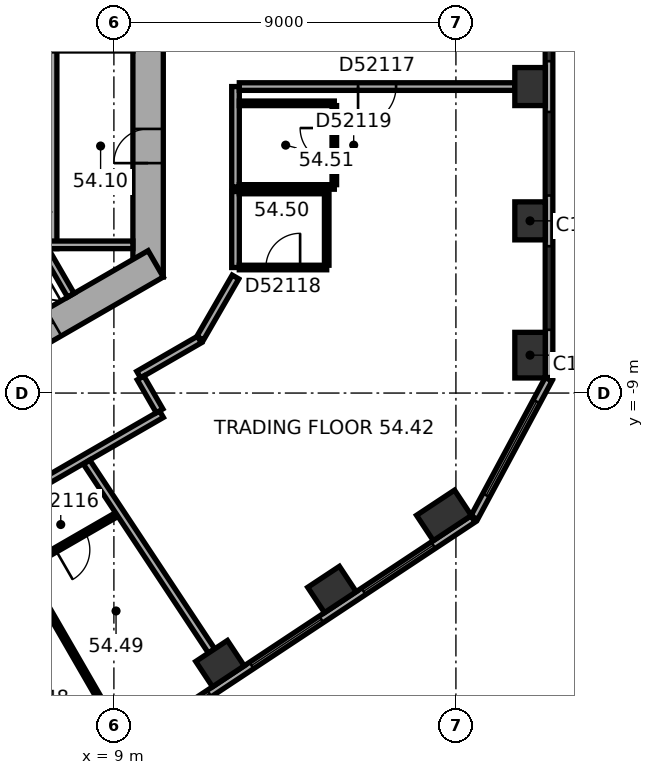
"""IFC4 building model, lengths in metres.
Left out: names, types, materials, properties, quantities, classifications, styles, units other than length and angle.
Written with IfcOpenShell. Run it as: python <this file> out.ifc"""

import sys

from ifc_helpers import new_model, si_unit, direction, frame, frame_2d, origin, origin_2d, place, context, subcontext, project, spatial, rectangle, extrude, element, fill, save


model = new_model("IFC4")
c1 = context("Model", 3, precision=1e-05, world=origin(), true_north=direction((0.0, 1.0)))
c2 = subcontext(c1, "Body", "Model", "MODEL_VIEW")
j1 = project(units=[si_unit("LENGTHUNIT", "METRE"), si_unit("PLANEANGLEUNIT", "RADIAN")], contexts=[c1])
p1 = place(None, origin())
s1 = spatial("IfcSite", under=j1, at=p1, CompositionType="ELEMENT")
p2 = place(p1, origin())
s2 = spatial("IfcBuilding", under=s1, at=p2, CompositionType="ELEMENT")
p3 = place(p2, frame((0.0, 0.0, 221.7)))
s3 = spatial("IfcBuildingStorey", under=s2, at=p3, CompositionType="ELEMENT", Elevation=221.7)
p4 = place(p3, frame((19.95, -8.003, 0.0), z_axis=(0.0, 0.0, 1.0), x_axis=(0.0, 1.0, 0.0)))
e1 = element("IfcColumn", 1, at=p4, inside=s3, PredefinedType="COLUMN", context=c2, shape_type="SweptSolid", body=[
    extrude(rectangle(XDim=1.2, YDim=0.8, at=origin_2d()), origin(), (0.0, 0.0, 1.0), 3.7),
])
for number, where, z_axis, x_axis in (
    (2, (19.95, -4.469, 0.0), (0.0, 0.0, 1.0), (0.0, 1.0, 0.0)),
    (3, (19.95, -0.936, 0.0), (0.0, 0.0, 1.0), (0.0, 1.0, 0.0)),
    (4, (11.791, -16.12, 0.0), (0.0, 0.0, 1.0), (0.834, 0.552, 0.0)),
    (5, (14.738, -14.169, 0.0), (0.0, 0.0, 1.0), (0.834, 0.552, 0.0)),
):
    element("IfcColumn", number, at=place(p3, frame(where, z_axis=z_axis, x_axis=x_axis)), inside=s3, PredefinedType="COLUMN", context=c2, shape_type="SweptSolid", body=[
        extrude(rectangle(XDim=1.0, YDim=0.8, at=origin_2d()), origin(), (0.0, 0.0, 1.0), 3.7),
    ])
p5 = place(p3, frame((17.685, -12.219, 0.0), z_axis=(0.0, 0.0, 1.0), x_axis=(0.833885822067, 0.551936985312, 0.0)))
e6 = element("IfcColumn", 6, at=p5, inside=s3, PredefinedType="COLUMN", context=c2, shape_type="SweptSolid", body=[
    extrude(rectangle(XDim=1.2, YDim=0.8, at=origin_2d()), origin(), (0.0, 0.0, 1.0), 3.7),
])
p6 = place(p3, frame((9.9, -5.947, 0.0), z_axis=(0.0, 0.0, 1.0), x_axis=(0.0, 1.0, 0.0)))
e7 = element("IfcWall", 7, at=p6, inside=s3, PredefinedType="SHEAR", context=c2, shape_type="SweptSolid", body=[
    extrude(rectangle(XDim=11.894, YDim=0.8, at=frame_2d((5.947, 0.0))), origin(), (0.0, 0.0, 1.0), 3.7),
])
p7 = place(p6, frame((6.147, 0.0, 0.0)))
e8 = element("IfcOpeningElement", 8, at=p7, cuts=e7, PredefinedType="OPENING", context=c2, shape_type="SweptSolid", body=[
    extrude(rectangle(XDim=1.5, YDim=2.1, at=frame_2d((0.75, 1.05))), frame((0.0, 0.41, 0.0), z_axis=(0.0, -1.0, 0.0), x_axis=(1.0, 0.0, 0.0)), (0.0, 0.0, 1.0), 0.82),
])
p8 = place(p6, frame((2.997, 0.0, 0.0)))
e9 = element("IfcOpeningElement", 9, at=p8, cuts=e7, PredefinedType="OPENING", context=c2, shape_type="SweptSolid", body=[
    extrude(rectangle(XDim=0.9, YDim=2.1, at=frame_2d((0.45, 1.05))), frame((0.0, 0.41, 0.0), z_axis=(0.0, -1.0, 0.0), x_axis=(1.0, 0.0, 0.0)), (0.0, 0.0, 1.0), 0.82),
])
p9 = place(p3, frame((-0.2, -11.547, 0.0), z_axis=(0.0, 0.0, 1.0), x_axis=(0.866023897231, 0.500002609418, 0.0)))
e10 = element("IfcWall", 10, at=p9, inside=s3, PredefinedType="SHEAR", context=c2, shape_type="SweptSolid", body=[
    extrude(rectangle(XDim=11.894, YDim=0.8, at=frame_2d((5.947, 0.0))), origin(), (0.0, 0.0, 1.0), 3.7),
])
p10 = place(p9, frame((2.497, 0.0, 0.0)))
e11 = element("IfcOpeningElement", 11, at=p10, cuts=e10, PredefinedType="OPENING", context=c2, shape_type="SweptSolid", body=[
    extrude(rectangle(XDim=1.1, YDim=2.1, at=frame_2d((0.55, 1.05))), frame((0.0, 0.41, 0.0), z_axis=(0.0, -1.0, 0.0), x_axis=(1.0, 0.0, 0.0)), (0.0, 0.0, 1.0), 0.82),
])
p11 = place(p9, frame((5.097, 0.0, 0.0)))
e12 = element("IfcOpeningElement", 12, at=p11, cuts=e10, PredefinedType="OPENING", context=c2, shape_type="SweptSolid", body=[
    extrude(rectangle(XDim=1.1, YDim=2.1, at=frame_2d((0.55, 1.05))), frame((0.0, 0.41, 0.0), z_axis=(0.0, -1.0, 0.0), x_axis=(1.0, 0.0, 0.0)), (0.0, 0.0, 1.0), 0.82),
])
p12 = place(p9, frame((7.697, 0.0, 0.0)))
e13 = element("IfcOpeningElement", 13, at=p12, cuts=e10, PredefinedType="OPENING", context=c2, shape_type="SweptSolid", body=[
    extrude(rectangle(XDim=1.1, YDim=2.1, at=frame_2d((0.55, 1.05))), frame((0.0, 0.41, 0.0), z_axis=(0.0, -1.0, 0.0), x_axis=(1.0, 0.0, 0.0)), (0.0, 0.0, 1.0), 0.82),
])
p13 = place(p3, frame((20.45, -8.59, 0.0), z_axis=(0.0, 0.0, 1.0), x_axis=(0.0, 1.0, 0.0)))
e14 = element("IfcWall", 14, at=p13, inside=s3, PredefinedType="STANDARD", context=c2, shape_type="SweptSolid", body=[
    extrude(rectangle(XDim=18.841, YDim=0.2, at=frame_2d((9.421, 0.0))), origin(), (0.0, 0.0, 1.0), 3.7),
])
p14 = place(p13, frame((1.254, 0.0, 0.9)))
e15 = element("IfcOpeningElement", 15, at=p14, cuts=e14, PredefinedType="OPENING", context=c2, shape_type="SweptSolid", body=[
    extrude(rectangle(XDim=2.2, YDim=2.0, at=frame_2d((1.1, 1.0))), frame((0.0, 0.11, 0.0), z_axis=(0.0, -1.0, 0.0), x_axis=(1.0, 0.0, 0.0)), (0.0, 0.0, 1.0), 0.22),
])
p15 = place(p13, frame((4.788, 0.0, 0.9)))
e16 = element("IfcOpeningElement", 16, at=p15, cuts=e14, PredefinedType="OPENING", context=c2, shape_type="SweptSolid", body=[
    extrude(rectangle(XDim=2.2, YDim=2.0, at=frame_2d((1.1, 1.0))), frame((0.0, 0.11, 0.0), z_axis=(0.0, -1.0, 0.0), x_axis=(1.0, 0.0, 0.0)), (0.0, 0.0, 1.0), 0.22),
])
p16 = place(p13, frame((8.322, 0.0, 0.9)))
e17 = element("IfcOpeningElement", 17, at=p16, cuts=e14, PredefinedType="OPENING", context=c2, shape_type="SweptSolid", body=[
    extrude(rectangle(XDim=2.2, YDim=2.0, at=frame_2d((1.1, 1.0))), frame((0.0, 0.11, 0.0), z_axis=(0.0, -1.0, 0.0), x_axis=(1.0, 0.0, 0.0)), (0.0, 0.0, 1.0), 0.22),
])
p17 = place(p13, frame((11.855, 0.0, 0.9)))
e18 = element("IfcOpeningElement", 18, at=p17, cuts=e14, PredefinedType="OPENING", context=c2, shape_type="SweptSolid", body=[
    extrude(rectangle(XDim=2.2, YDim=2.0, at=frame_2d((1.1, 1.0))), frame((0.0, 0.11, 0.0), z_axis=(0.0, -1.0, 0.0), x_axis=(1.0, 0.0, 0.0)), (0.0, 0.0, 1.0), 0.22),
])
p18 = place(p13, frame((15.389, 0.0, 0.9)))
e19 = element("IfcOpeningElement", 19, at=p18, cuts=e14, PredefinedType="OPENING", context=c2, shape_type="SweptSolid", body=[
    extrude(rectangle(XDim=2.2, YDim=2.0, at=frame_2d((1.1, 1.0))), frame((0.0, 0.11, 0.0), z_axis=(0.0, -1.0, 0.0), x_axis=(1.0, 0.0, 0.0)), (0.0, 0.0, 1.0), 0.22),
])
p19 = place(p3, frame((2.739, -22.711, 0.0), z_axis=(0.0, 0.0, 1.0), x_axis=(0.833885723098, 0.551937134838, 0.0)))
e20 = element("IfcWall", 20, at=p19, inside=s3, PredefinedType="STANDARD", context=c2, shape_type="SweptSolid", body=[
    extrude(rectangle(XDim=18.841, YDim=0.2, at=frame_2d((9.421, 0.0))), origin(), (0.0, 0.0, 1.0), 3.7),
])
p20 = place(p19, frame((1.252, 0.0, 0.9)))
e21 = element("IfcOpeningElement", 21, at=p20, cuts=e20, PredefinedType="OPENING", context=c2, shape_type="SweptSolid", body=[
    extrude(rectangle(XDim=2.2, YDim=2.0, at=frame_2d((1.1, 1.0))), frame((0.0, 0.11, 0.0), z_axis=(0.0, -1.0, 0.0), x_axis=(1.0, 0.0, 0.0)), (0.0, 0.0, 1.0), 0.22),
])
p21 = place(p19, frame((4.786, 0.0, 0.9)))
e22 = element("IfcOpeningElement", 22, at=p21, cuts=e20, PredefinedType="OPENING", context=c2, shape_type="SweptSolid", body=[
    extrude(rectangle(XDim=2.2, YDim=2.0, at=frame_2d((1.1, 1.0))), frame((0.0, 0.11, 0.0), z_axis=(0.0, -1.0, 0.0), x_axis=(1.0, 0.0, 0.0)), (0.0, 0.0, 1.0), 0.22),
])
p22 = place(p19, frame((8.32, 0.0, 0.9)))
e23 = element("IfcOpeningElement", 23, at=p22, cuts=e20, PredefinedType="OPENING", context=c2, shape_type="SweptSolid", body=[
    extrude(rectangle(XDim=2.2, YDim=2.0, at=frame_2d((1.1, 1.0))), frame((0.0, 0.11, 0.0), z_axis=(0.0, -1.0, 0.0), x_axis=(1.0, 0.0, 0.0)), (0.0, 0.0, 1.0), 0.22),
])
p23 = place(p19, frame((11.854, 0.0, 0.9)))
e24 = element("IfcOpeningElement", 24, at=p23, cuts=e20, PredefinedType="OPENING", context=c2, shape_type="SweptSolid", body=[
    extrude(rectangle(XDim=2.2, YDim=2.0, at=frame_2d((1.1, 1.0))), frame((0.0, 0.11, 0.0), z_axis=(0.0, -1.0, 0.0), x_axis=(1.0, 0.0, 0.0)), (0.0, 0.0, 1.0), 0.22),
])
p24 = place(p19, frame((15.387, 0.0, 0.9)))
e25 = element("IfcOpeningElement", 25, at=p24, cuts=e20, PredefinedType="OPENING", context=c2, shape_type="SweptSolid", body=[
    extrude(rectangle(XDim=2.2, YDim=2.0, at=frame_2d((1.1, 1.0))), frame((0.0, 0.11, 0.0), z_axis=(0.0, -1.0, 0.0), x_axis=(1.0, 0.0, 0.0)), (0.0, 0.0, 1.0), 0.22),
])
p25 = place(p3, frame((18.483, -12.276, 0.0), z_axis=(0.0, 0.0, 1.0), x_axis=(0.473267675015, 0.880918672629, 0.0)))
e26 = element("IfcWall", 26, at=p25, inside=s3, PredefinedType="STANDARD", context=c2, shape_type="SweptSolid", body=[
    extrude(rectangle(XDim=4.13, YDim=0.2, at=frame_2d((2.065, 0.0))), origin(), (0.0, 0.0, 1.0), 3.7),
])
p26 = place(p25, frame((0.665, 0.0, 0.9)))
e27 = element("IfcOpeningElement", 27, at=p26, cuts=e26, PredefinedType="OPENING", context=c2, shape_type="SweptSolid", body=[
    extrude(rectangle(XDim=2.8, YDim=2.0, at=frame_2d((1.4, 1.0))), frame((0.0, 0.11, 0.0), z_axis=(0.0, -1.0, 0.0), x_axis=(1.0, 0.0, 0.0)), (0.0, 0.0, 1.0), 0.22),
])
p27 = place(p3, frame((7.4, -5.2, 0.0), z_axis=(0.0, 0.0, 1.0), x_axis=(0.0, 1.0, 0.0)))
e28 = element("IfcWall", 28, at=p27, inside=s3, PredefinedType="PARTITIONING", context=c2, shape_type="SweptSolid", body=[
    extrude(rectangle(XDim=5.4, YDim=0.2, at=frame_2d((2.7, 0.0))), origin(), (0.0, 0.0, 1.0), 3.42),
])
for number, where, z_axis, x_axis in (
    (29, (7.3, -5.1, 0.0), (0.0, 0.0, 1.0), (1.0, 0.0, 0.0)),
    (30, (6.768, -4.522, 0.0), (0.0, 0.0, 1.0), (0.5, -0.866, 0.0)),
):
    element("IfcWall", number, at=place(p3, frame(where, z_axis=z_axis, x_axis=x_axis)), inside=s3, PredefinedType="PARTITIONING", context=c2, shape_type="SweptSolid", body=[
        extrude(rectangle(XDim=2.2, YDim=0.2, at=frame_2d((1.1, 0.0))), origin(), (0.0, 0.0, 1.0), 3.42),
    ])
p28 = place(p3, frame((2.716, -13.906, 0.0), z_axis=(0.0, 0.0, 1.0), x_axis=(0.866040290674, 0.499974214264, 0.0)))
e31 = element("IfcWall", 31, at=p28, inside=s3, PredefinedType="PARTITIONING", context=c2, shape_type="SweptSolid", body=[
    extrude(rectangle(XDim=8.702, YDim=0.2, at=frame_2d((4.351, 0.0))), origin(), (0.0, 0.0, 1.0), 3.42),
])
p29 = place(p28, frame((2.679, 0.0, 0.0)))
e32 = element("IfcOpeningElement", 32, at=p29, cuts=e31, PredefinedType="OPENING", context=c2, shape_type="SweptSolid", body=[
    extrude(rectangle(XDim=1.0, YDim=2.1, at=frame_2d((0.5, 1.05))), frame((0.0, 0.11, 0.0), z_axis=(0.0, -1.0, 0.0), x_axis=(1.0, 0.0, 0.0)), (0.0, 0.0, 1.0), 0.22),
])
p30 = place(p3, frame((3.117, -15.638, 0.0), z_axis=(0.0, 0.0, 1.0), x_axis=(0.866031365477, 0.499989673903, 0.0)))
e33 = element("IfcWall", 33, at=p30, inside=s3, PredefinedType="PARTITIONING", context=c2, shape_type="SweptSolid", body=[
    extrude(rectangle(XDim=6.881, YDim=0.12, at=frame_2d((3.44, 0.0))), origin(), (0.0, 0.0, 1.0), 3.42),
])
p31 = place(p30, frame((0.5, 0.0, 0.0)))
e34 = element("IfcOpeningElement", 34, at=p31, cuts=e33, PredefinedType="OPENING", context=c2, shape_type="SweptSolid", body=[
    extrude(rectangle(XDim=1.0, YDim=2.1, at=frame_2d((0.5, 1.05))), frame((0.0, 0.07, 0.0), z_axis=(0.0, -1.0, 0.0), x_axis=(1.0, 0.0, 0.0)), (0.0, 0.0, 1.0), 0.14),
])
p32 = place(p30, frame((2.583, 0.0, 0.0)))
e35 = element("IfcOpeningElement", 35, at=p32, cuts=e33, PredefinedType="OPENING", context=c2, shape_type="SweptSolid", body=[
    extrude(rectangle(XDim=0.9, YDim=2.1, at=frame_2d((0.45, 1.05))), frame((0.0, 0.07, 0.0), z_axis=(0.0, -1.0, 0.0), x_axis=(1.0, 0.0, 0.0)), (0.0, 0.0, 1.0), 0.14),
])
p33 = place(p30, frame((5.023, 0.0, 0.0)))
e36 = element("IfcOpeningElement", 36, at=p33, cuts=e33, PredefinedType="OPENING", context=c2, shape_type="SweptSolid", body=[
    extrude(rectangle(XDim=0.9, YDim=2.1, at=frame_2d((0.45, 1.05))), frame((0.0, 0.07, 0.0), z_axis=(0.0, -1.0, 0.0), x_axis=(1.0, 0.0, 0.0)), (0.0, 0.0, 1.0), 0.14),
])
p34 = place(p3, frame((8.912, -17.545, 0.0), z_axis=(0.0, 0.0, 1.0), x_axis=(-0.500022113525, 0.866012636158, 0.0)))
e37 = element("IfcWall", 37, at=p34, inside=s3, PredefinedType="PARTITIONING", context=c2, shape_type="SweptSolid", body=[
    extrude(rectangle(XDim=4.49, YDim=0.12, at=frame_2d((2.245, 0.0))), origin(), (0.0, 0.0, 1.0), 2.87),
])
p35 = place(p3, frame((9.652, -8.515, 0.0), z_axis=(0.0, 0.0, 1.0), x_axis=(0.866020375458, 0.500008709215, 0.0)))
e38 = element("IfcWall", 38, at=p35, inside=s3, PredefinedType="PARTITIONING", context=c2, shape_type="SweptSolid", body=[
    extrude(rectangle(XDim=1.846, YDim=0.2, at=frame_2d((0.923, 0.0))), origin(), (0.0, 0.0, 1.0), 3.42),
])
p36 = place(p3, frame((10.202, -9.469, 0.0), z_axis=(0.0, 0.0, 1.0), x_axis=(-0.499968756647, 0.866043441391, 0.0)))
e39 = element("IfcWall", 39, at=p36, inside=s3, PredefinedType="PARTITIONING", context=c2, shape_type="SweptSolid", body=[
    extrude(rectangle(XDim=1.001, YDim=0.2, at=frame_2d((0.5, 0.0))), origin(), (0.0, 0.0, 1.0), 3.42),
])
p37 = place(p3, frame((11.27, -7.558, 0.0), z_axis=(0.0, 0.0, 1.0), x_axis=(0.499964847546, 0.866045698112, 0.0)))
e40 = element("IfcWall", 40, at=p37, inside=s3, PredefinedType="PARTITIONING", context=c2, shape_type="SweptSolid", body=[
    extrude(rectangle(XDim=1.86, YDim=0.2, at=frame_2d((0.93, 0.0))), origin(), (0.0, 0.0, 1.0), 3.42),
])
p38 = place(p3, frame((11.571, -15.786, 0.0), z_axis=(0.0, 0.0, 1.0), x_axis=(-0.551944861763, 0.833880608705, 0.0)))
e41 = element("IfcWall", 41, at=p38, inside=s3, PredefinedType="PARTITIONING", context=c2, shape_type="SweptSolid", body=[
    extrude(rectangle(XDim=5.957, YDim=0.2, at=frame_2d((2.979, 0.0))), origin(), (0.0, 0.0, 1.0), 3.42),
])
p39 = place(p3, frame((12.2, -5.697, 0.0), z_axis=(0.0, 0.0, 1.0), x_axis=(0.0, 1.0, 0.0)))
e42 = element("IfcWall", 42, at=p39, inside=s3, PredefinedType="PARTITIONING", context=c2, shape_type="SweptSolid", body=[
    extrude(rectangle(XDim=2.0, YDim=0.2, at=frame_2d((1.0, 0.0))), origin(), (0.0, 0.0, 1.0), 3.42),
])
p40 = place(p3, frame((12.2, -3.577, 0.0), z_axis=(0.0, 0.0, 1.0), x_axis=(0.0, 1.0, 0.0)))
e43 = element("IfcWall", 43, at=p40, inside=s3, PredefinedType="PARTITIONING", context=c2, shape_type="SweptSolid", body=[
    extrude(rectangle(XDim=2.641, YDim=0.2, at=frame_2d((1.321, 0.0))), origin(), (0.0, 0.0, 1.0), 3.42),
])
p41 = place(p3, frame((12.3, -3.697, 0.0), z_axis=(0.0, 0.0, 1.0), x_axis=(1.0, 0.0, 0.0)))
e44 = element("IfcWall", 44, at=p41, inside=s3, PredefinedType="PARTITIONING", context=c2, shape_type="SweptSolid", body=[
    extrude(rectangle(XDim=2.3, YDim=0.12, at=frame_2d((1.15, 0.0))), origin(), (0.0, 0.0, 1.0), 3.42),
])
p42 = place(p3, frame((12.3, -1.377, 0.0), z_axis=(0.0, 0.0, 1.0), x_axis=(1.0, 0.0, 0.0)))
e45 = element("IfcWall", 45, at=p42, inside=s3, PredefinedType="PARTITIONING", context=c2, shape_type="SweptSolid", body=[
    extrude(rectangle(XDim=2.5, YDim=0.12, at=frame_2d((1.25, 0.0))), origin(), (0.0, 0.0, 1.0), 3.42),
])
p43 = place(p3, frame((12.3, -0.936, 0.0), z_axis=(0.0, 0.0, 1.0), x_axis=(1.0, 0.0, 0.0)))
e46 = element("IfcWall", 46, at=p43, inside=s3, PredefinedType="PARTITIONING", context=c2, shape_type="SweptSolid", body=[
    extrude(rectangle(XDim=7.25, YDim=0.2, at=frame_2d((3.625, 0.0))), origin(), (0.0, 0.0, 1.0), 2.87),
])
p44 = place(p43, frame((3.125, 0.0, 0.0)))
e47 = element("IfcOpeningElement", 47, at=p44, cuts=e46, PredefinedType="OPENING", context=c2, shape_type="SweptSolid", body=[
    extrude(rectangle(XDim=1.0, YDim=2.1, at=frame_2d((0.5, 1.05))), frame((0.0, 0.11, 0.0), z_axis=(0.0, -1.0, 0.0), x_axis=(1.0, 0.0, 0.0)), (0.0, 0.0, 1.0), 0.22),
])
p45 = place(p3, frame((14.6, -5.697, 0.0), z_axis=(0.0, 0.0, 1.0), x_axis=(-1.0, 0.0, 0.0)))
e48 = element("IfcWall", 48, at=p45, inside=s3, PredefinedType="PARTITIONING", context=c2, shape_type="SweptSolid", body=[
    extrude(rectangle(XDim=2.3, YDim=0.12, at=frame_2d((1.15, 0.0))), origin(), (0.0, 0.0, 1.0), 3.42),
])
p46 = place(p45, frame((0.7, 0.0, 0.0)))
e49 = element("IfcOpeningElement", 49, at=p46, cuts=e48, PredefinedType="OPENING", context=c2, shape_type="SweptSolid", body=[
    extrude(rectangle(XDim=0.9, YDim=2.1, at=frame_2d((0.45, 1.05))), frame((0.0, 0.07, 0.0), z_axis=(0.0, -1.0, 0.0), x_axis=(1.0, 0.0, 0.0)), (0.0, 0.0, 1.0), 0.14),
])
p47 = place(p3, frame((14.6, -3.757, 0.0), z_axis=(0.0, 0.0, 1.0), x_axis=(0.0, -1.0, 0.0)))
e50 = element("IfcWall", 50, at=p47, inside=s3, PredefinedType="PARTITIONING", context=c2, shape_type="SweptSolid", body=[
    extrude(rectangle(XDim=1.88, YDim=0.12, at=frame_2d((0.94, 0.0))), origin(), (0.0, 0.0, 1.0), 3.42),
])
p48 = place(p3, frame((14.8, -3.577, 0.0), z_axis=(0.0, 0.0, 1.0), x_axis=(-1.0, 0.0, 0.0)))
e51 = element("IfcWall", 51, at=p48, inside=s3, PredefinedType="PARTITIONING", context=c2, shape_type="SweptSolid", body=[
    extrude(rectangle(XDim=2.5, YDim=0.12, at=frame_2d((1.25, 0.0))), origin(), (0.0, 0.0, 1.0), 3.42),
])
p49 = place(p3, frame((14.8, -1.437, 0.0), z_axis=(0.0, 0.0, 1.0), x_axis=(0.0, -1.0, 0.0)))
e52 = element("IfcWall", 52, at=p49, inside=s3, PredefinedType="PARTITIONING", context=c2, shape_type="SweptSolid", body=[
    extrude(rectangle(XDim=2.08, YDim=0.12, at=frame_2d((1.04, 0.0))), origin(), (0.0, 0.0, 1.0), 3.42),
])
p50 = place(p49, frame((0.59, 0.0, 0.0)))
e53 = element("IfcOpeningElement", 53, at=p50, cuts=e52, PredefinedType="OPENING", context=c2, shape_type="SweptSolid", body=[
    extrude(rectangle(XDim=0.9, YDim=2.1, at=frame_2d((0.45, 1.05))), frame((0.0, 0.07, 0.0), z_axis=(0.0, -1.0, 0.0), x_axis=(1.0, 0.0, 0.0)), (0.0, 0.0, 1.0), 0.14),
])
p51 = place(p14, origin())
e54 = element("IfcWindow", 54, at=p51, inside=s3, PartitioningType="SINGLE_PANEL", PredefinedType="WINDOW", context=c2, shape_type="SweptSolid", body=[
    extrude(rectangle(XDim=2.2, YDim=2.0, at=frame_2d((1.1, 1.0))), frame((0.0, 0.03, 0.0), z_axis=(0.0, -1.0, 0.0), x_axis=(1.0, 0.0, 0.0)), (0.0, 0.0, 1.0), 0.06),
])
fill(e15, e54)
p52 = place(p15, origin())
e55 = element("IfcWindow", 55, at=p52, inside=s3, PartitioningType="SINGLE_PANEL", PredefinedType="WINDOW", context=c2, shape_type="SweptSolid", body=[
    extrude(rectangle(XDim=2.2, YDim=2.0, at=frame_2d((1.1, 1.0))), frame((0.0, 0.03, 0.0), z_axis=(0.0, -1.0, 0.0), x_axis=(1.0, 0.0, 0.0)), (0.0, 0.0, 1.0), 0.06),
])
fill(e16, e55)
p53 = place(p16, origin())
e56 = element("IfcWindow", 56, at=p53, inside=s3, PartitioningType="SINGLE_PANEL", PredefinedType="WINDOW", context=c2, shape_type="SweptSolid", body=[
    extrude(rectangle(XDim=2.2, YDim=2.0, at=frame_2d((1.1, 1.0))), frame((0.0, 0.03, 0.0), z_axis=(0.0, -1.0, 0.0), x_axis=(1.0, 0.0, 0.0)), (0.0, 0.0, 1.0), 0.06),
])
fill(e17, e56)
p54 = place(p22, origin())
e57 = element("IfcWindow", 57, at=p54, inside=s3, PartitioningType="SINGLE_PANEL", PredefinedType="WINDOW", context=c2, shape_type="SweptSolid", body=[
    extrude(rectangle(XDim=2.2, YDim=2.0, at=frame_2d((1.1, 1.0))), frame((0.0, 0.03, 0.0), z_axis=(0.0, -1.0, 0.0), x_axis=(1.0, 0.0, 0.0)), (0.0, 0.0, 1.0), 0.06),
])
fill(e23, e57)
p55 = place(p23, origin())
e58 = element("IfcWindow", 58, at=p55, inside=s3, PartitioningType="SINGLE_PANEL", PredefinedType="WINDOW", context=c2, shape_type="SweptSolid", body=[
    extrude(rectangle(XDim=2.2, YDim=2.0, at=frame_2d((1.1, 1.0))), frame((0.0, 0.03, 0.0), z_axis=(0.0, -1.0, 0.0), x_axis=(1.0, 0.0, 0.0)), (0.0, 0.0, 1.0), 0.06),
])
fill(e24, e58)
p56 = place(p24, origin())
e59 = element("IfcWindow", 59, at=p56, inside=s3, PartitioningType="SINGLE_PANEL", PredefinedType="WINDOW", context=c2, shape_type="SweptSolid", body=[
    extrude(rectangle(XDim=2.2, YDim=2.0, at=frame_2d((1.1, 1.0))), frame((0.0, 0.03, 0.0), z_axis=(0.0, -1.0, 0.0), x_axis=(1.0, 0.0, 0.0)), (0.0, 0.0, 1.0), 0.06),
])
fill(e25, e59)
p57 = place(p26, origin())
e60 = element("IfcWindow", 60, at=p57, inside=s3, PartitioningType="SINGLE_PANEL", PredefinedType="WINDOW", context=c2, shape_type="SweptSolid", body=[
    extrude(rectangle(XDim=2.8, YDim=2.0, at=frame_2d((1.4, 1.0))), frame((0.0, 0.03, 0.0), z_axis=(0.0, -1.0, 0.0), x_axis=(1.0, 0.0, 0.0)), (0.0, 0.0, 1.0), 0.06),
])
fill(e27, e60)
p58 = place(p8, origin())
e61 = element("IfcDoor", 61, at=p58, inside=s3, OperationType="SINGLE_SWING_LEFT", PredefinedType="DOOR", context=c2, shape_type="SweptSolid", body=[
    extrude(rectangle(XDim=0.9, YDim=2.1, at=frame_2d((0.45, 1.05))), frame((0.0, 0.025, 0.0), z_axis=(0.0, -1.0, 0.0), x_axis=(1.0, 0.0, 0.0)), (0.0, 0.0, 1.0), 0.05),
])
fill(e9, e61)
p59 = place(p12, origin())
e62 = element("IfcDoor", 62, at=p59, inside=s3, OperationType="DOUBLE_DOOR_SLIDING", PredefinedType="DOOR", context=c2, shape_type="SweptSolid", body=[
    extrude(rectangle(XDim=1.1, YDim=2.1, at=frame_2d((0.55, 1.05))), frame((0.0, 0.025, 0.0), z_axis=(0.0, -1.0, 0.0), x_axis=(1.0, 0.0, 0.0)), (0.0, 0.0, 1.0), 0.05),
])
fill(e13, e62)
p60 = place(p33, origin())
e63 = element("IfcDoor", 63, at=p60, inside=s3, OperationType="SINGLE_SWING_LEFT", PredefinedType="DOOR", context=c2, shape_type="SweptSolid", body=[
    extrude(rectangle(XDim=0.9, YDim=2.1, at=frame_2d((0.45, 1.05))), frame((0.0, 0.025, 0.0), z_axis=(0.0, -1.0, 0.0), x_axis=(1.0, 0.0, 0.0)), (0.0, 0.0, 1.0), 0.05),
])
fill(e36, e63)
p61 = place(p44, origin())
e64 = element("IfcDoor", 64, at=p61, inside=s3, OperationType="SINGLE_SWING_LEFT", PredefinedType="DOOR", context=c2, shape_type="SweptSolid", body=[
    extrude(rectangle(XDim=1.0, YDim=2.1, at=frame_2d((0.5, 1.05))), frame((0.0, 0.025, 0.0), z_axis=(0.0, -1.0, 0.0), x_axis=(1.0, 0.0, 0.0)), (0.0, 0.0, 1.0), 0.05),
])
fill(e47, e64)
p62 = place(p46, origin())
e65 = element("IfcDoor", 65, at=p62, inside=s3, OperationType="SINGLE_SWING_LEFT", PredefinedType="DOOR", context=c2, shape_type="SweptSolid", body=[
    extrude(rectangle(XDim=0.9, YDim=2.1, at=frame_2d((0.45, 1.05))), frame((0.0, 0.025, 0.0), z_axis=(0.0, -1.0, 0.0), x_axis=(1.0, 0.0, 0.0)), (0.0, 0.0, 1.0), 0.05),
])
fill(e49, e65)
p63 = place(p50, origin())
e66 = element("IfcDoor", 66, at=p63, inside=s3, OperationType="SINGLE_SWING_LEFT", PredefinedType="DOOR", context=c2, shape_type="SweptSolid", body=[
    extrude(rectangle(XDim=0.9, YDim=2.1, at=frame_2d((0.45, 1.05))), frame((0.0, 0.025, 0.0), z_axis=(0.0, -1.0, 0.0), x_axis=(1.0, 0.0, 0.0)), (0.0, 0.0, 1.0), 0.05),
])
fill(e53, e66)
save(model, sys.argv[1])
